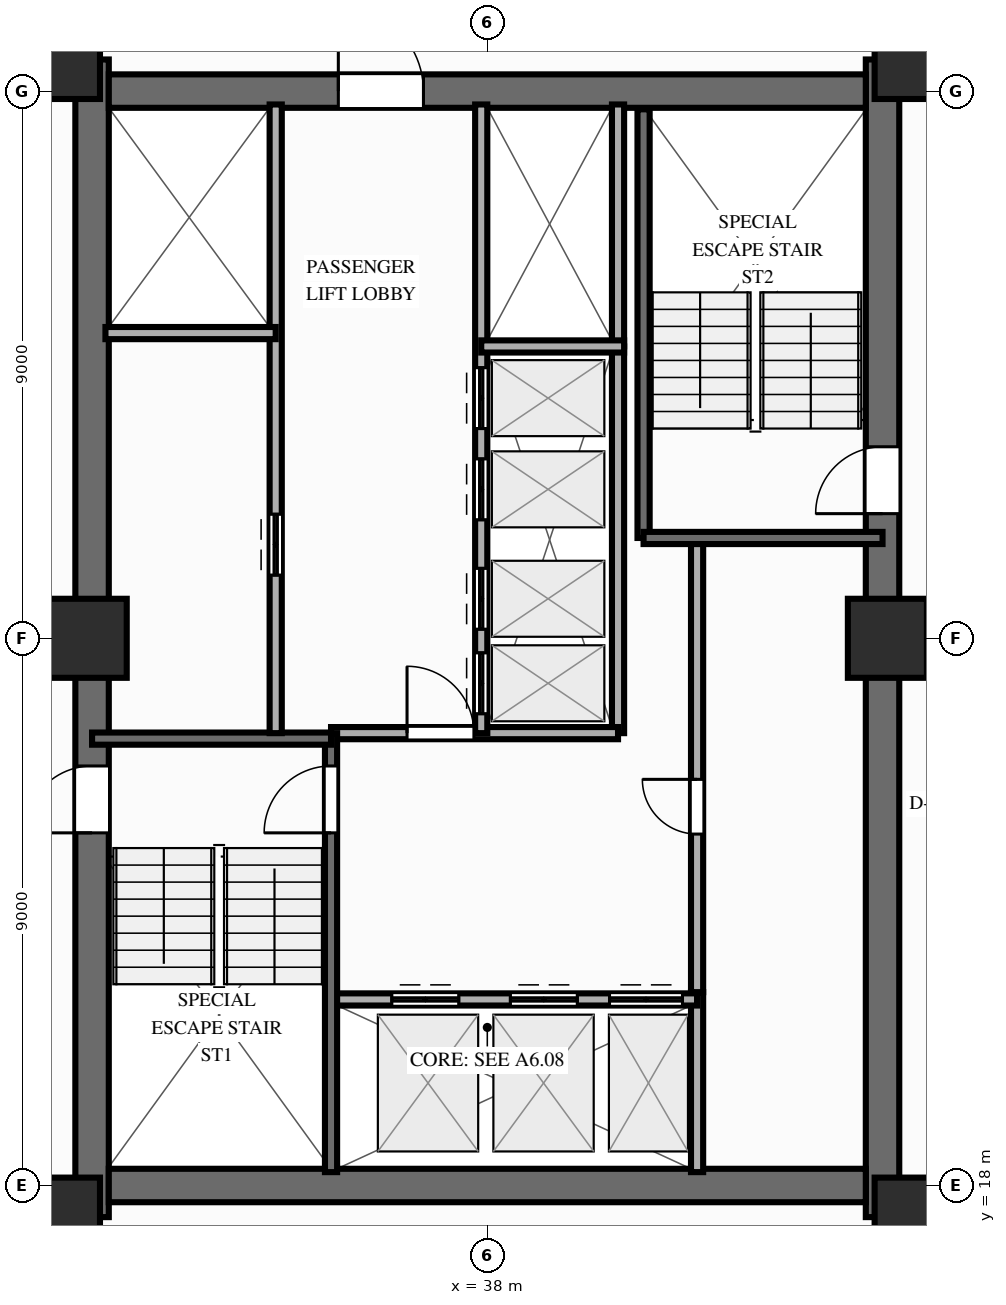
"""IFC4 building model, lengths in metres.
Left out: names, types, materials, properties, quantities, classifications, styles, units other than length and angle.
Written with IfcOpenShell. Run it as: python <this file> out.ifc"""

import sys

from ifc_helpers import new_model, si_unit, direction, frame, frame_2d, origin, origin_2d, place, context, subcontext, project, spatial, rectangle, extrude, source, transform, mapped, element, fill, save


model = new_model("IFC4")
c1 = context("Model", 3, precision=1e-05, world=origin(), true_north=direction((0.0, 1.0)))
c2 = subcontext(c1, "Body", "Model", "MODEL_VIEW")
j1 = project(units=[si_unit("LENGTHUNIT", "METRE"), si_unit("PLANEANGLEUNIT", "RADIAN")], contexts=[c1])
p1 = place(None, origin())
s1 = spatial("IfcSite", under=j1, at=p1, CompositionType="ELEMENT")
p2 = place(p1, origin())
s2 = spatial("IfcBuilding", under=s1, at=p2, CompositionType="ELEMENT")
p3 = place(p2, frame((0.0, 0.0, 92.85)))
s3 = spatial("IfcBuildingStorey", under=s2, at=p3, CompositionType="ELEMENT", Elevation=92.85)
p4 = place(p3, frame((31.5, 17.48, 0.0), z_axis=(0.0, 0.0, 1.0), x_axis=(0.0, 1.0, 0.0)))
e1 = element("IfcWall", 1, at=p4, inside=s3, PredefinedType="SHEAR", context=c2, shape_type="SweptSolid", body=[
    extrude(rectangle(XDim=19.04, YDim=0.55, at=frame_2d((9.52, 0.0))), origin(), (0.0, 0.0, 1.0), 3.0),
])
p5 = place(p4, frame((6.32, 0.0, 0.0)))
e2 = element("IfcOpeningElement", 2, at=p5, cuts=e1, PredefinedType="OPENING", context=c2, shape_type="SweptSolid", body=[
    extrude(rectangle(XDim=1.1, YDim=2.15, at=frame_2d((0.55, 1.075))), frame((0.0, 0.287, 0.0), z_axis=(0.0, -1.0, 0.0), x_axis=(1.0, 0.0, 0.0)), (0.0, 0.0, 1.0), 0.574),
])
p6 = place(p3, frame((44.5, 17.48, 0.0), z_axis=(0.0, 0.0, 1.0), x_axis=(0.0, 1.0, 0.0)))
e3 = element("IfcWall", 3, at=p6, inside=s3, PredefinedType="SHEAR", context=c2, shape_type="SweptSolid", body=[
    extrude(rectangle(XDim=19.04, YDim=0.55, at=frame_2d((9.52, 0.0))), origin(), (0.0, 0.0, 1.0), 3.0),
])
p7 = place(p6, frame((12.67, 0.0, 0.0), z_axis=(0.0, 0.0, 1.0), x_axis=(-1.0, 0.0, 0.0)))
e4 = element("IfcOpeningElement", 4, at=p7, cuts=e3, PredefinedType="OPENING", context=c2, shape_type="SweptSolid", body=[
    extrude(rectangle(XDim=1.1, YDim=2.15, at=frame_2d((0.55, 1.075))), frame((0.0, 0.287, 0.0), z_axis=(0.0, -1.0, 0.0), x_axis=(1.0, 0.0, 0.0)), (0.0, 0.0, 1.0), 0.574),
])
p8 = place(p3, frame((31.775, 18.0, 0.0), z_axis=(0.0, 0.0, 1.0), x_axis=(1.0, 0.0, 0.0)))
e5 = element("IfcWall", 5, at=p8, inside=s3, PredefinedType="SHEAR", context=c2, shape_type="SweptSolid", body=[
    extrude(rectangle(XDim=12.45, YDim=0.55, at=frame_2d((6.225, 0.0))), origin(), (0.0, 0.0, 1.0), 3.0),
])
p9 = place(p3, frame((31.775, 36.0, 0.0), z_axis=(0.0, 0.0, 1.0), x_axis=(1.0, 0.0, 0.0)))
e6 = element("IfcWall", 6, at=p9, inside=s3, PredefinedType="SHEAR", context=c2, shape_type="SweptSolid", body=[
    extrude(rectangle(XDim=12.45, YDim=0.55, at=frame_2d((6.225, 0.0))), origin(), (0.0, 0.0, 1.0), 3.0),
])
p10 = place(p9, frame((5.175, 0.0, 0.0), z_axis=(0.0, 0.0, 1.0), x_axis=(-1.0, 0.0, 0.0)))
e7 = element("IfcOpeningElement", 7, at=p10, cuts=e6, PredefinedType="OPENING", context=c2, shape_type="SweptSolid", body=[
    extrude(rectangle(XDim=1.4, YDim=2.15, at=frame_2d((0.7, 1.075))), frame((0.0, 0.287, 0.0), z_axis=(0.0, -1.0, 0.0), x_axis=(1.0, 0.0, 0.0)), (0.0, 0.0, 1.0), 0.574),
])
m1 = source(origin(), c2, "Body", "SweptSolid", [
    extrude(rectangle(XDim=1.3, YDim=1.3, at=origin_2d()), origin(), (0.0, 0.0, 1.0), 3.0),
])
for number, where, z_axis, x_axis in (
    (8, (30.98, 17.48, 0.0), (0.0, 0.0, 1.0), (1.0, 0.0, 0.0)),
    (9, (45.02, 17.48, 0.0), (0.0, 0.0, 1.0), (1.0, 0.0, 0.0)),
    (10, (30.98, 36.52, 0.0), (0.0, 0.0, 1.0), (1.0, 0.0, 0.0)),
    (11, (45.02, 36.52, 0.0), (0.0, 0.0, 1.0), (1.0, 0.0, 0.0)),
    (12, (31.42, 27.0, 0.0), (0.0, 0.0, 1.0), (1.0, 0.0, 0.0)),
    (13, (44.58, 27.0, 0.0), (0.0, 0.0, 1.0), (1.0, 0.0, 0.0)),
):
    element("IfcColumn", number, at=place(p3, frame(where, z_axis=z_axis, x_axis=x_axis)), inside=s3, PredefinedType="COLUMN", context=c2, shape_type="MappedRepresentation", body=[
        mapped(m1, transform((0.0, 0.0, 0.0), scale=1.0)),
    ])
p11 = place(p3, frame((41.45, 18.22, 0.0), z_axis=(0.0, 0.0, 1.0), x_axis=(0.0, 1.0, 0.0)))
e14 = element("IfcWall", 14, at=p11, inside=s3, PredefinedType="PARTITIONING", context=c2, shape_type="SweptSolid", body=[
    extrude(rectangle(XDim=2.96, YDim=0.2, at=frame_2d((1.48, 0.0))), origin(), (0.0, 0.0, 1.0), 2.79),
])
p12 = place(p3, frame((41.45, 21.18, 0.0), z_axis=(0.0, 0.0, 1.0), x_axis=(0.0, 1.0, 0.0)))
e15 = element("IfcWall", 15, at=p12, inside=s3, PredefinedType="PARTITIONING", context=c2, shape_type="SweptSolid", body=[
    extrude(rectangle(XDim=7.42, YDim=0.2, at=frame_2d((3.71, 0.0))), origin(), (0.0, 0.0, 1.0), 2.79),
])
p13 = place(p12, frame((2.6, 0.0, 0.0)))
e16 = element("IfcOpeningElement", 16, at=p13, cuts=e15, PredefinedType="OPENING", context=c2, shape_type="SweptSolid", body=[
    extrude(rectangle(XDim=0.9, YDim=2.1, at=frame_2d((0.45, 1.05))), frame((0.0, 0.112, 0.0), z_axis=(0.0, -1.0, 0.0), x_axis=(1.0, 0.0, 0.0)), (0.0, 0.0, 1.0), 0.224),
])
p14 = place(p3, frame((40.15, 25.44, 0.0), z_axis=(0.0, 0.0, 1.0), x_axis=(0.0, 1.0, 0.0)))
e17 = element("IfcWall", 17, at=p14, inside=s3, PredefinedType="PARTITIONING", context=c2, shape_type="SweptSolid", body=[
    extrude(rectangle(XDim=6.36, YDim=0.2, at=frame_2d((3.18, 0.0))), origin(), (0.0, 0.0, 1.0), 2.79),
])
p15 = place(p3, frame((40.15, 31.8, 0.0), z_axis=(0.0, 0.0, 1.0), x_axis=(0.0, 1.0, 0.0)))
e18 = element("IfcWall", 18, at=p15, inside=s3, PredefinedType="PARTITIONING", context=c2, shape_type="SweptSolid", body=[
    extrude(rectangle(XDim=3.98, YDim=0.2, at=frame_2d((1.99, 0.0))), origin(), (0.0, 0.0, 1.0), 2.79),
])
p16 = place(p3, frame((35.43, 21.06, 0.0), z_axis=(0.0, 0.0, 1.0), x_axis=(1.0, 0.0, 0.0)))
e19 = element("IfcWall", 19, at=p16, inside=s3, PredefinedType="PARTITIONING", context=c2, shape_type="SweptSolid", body=[
    extrude(rectangle(XDim=6.02, YDim=0.2, at=frame_2d((3.01, 0.0))), origin(), (0.0, 0.0, 1.0), 2.79),
])
p17 = place(p16, frame((1.0, 0.0, 0.0)))
e20 = element("IfcOpeningElement", 20, at=p17, cuts=e19, PredefinedType="OPENING", context=c2, shape_type="SweptSolid", body=[
    extrude(rectangle(XDim=1.1, YDim=2.15, at=frame_2d((0.55, 1.075))), frame((0.0, 0.112, 0.0), z_axis=(0.0, -1.0, 0.0), x_axis=(1.0, 0.0, 0.0)), (0.0, 0.0, 1.0), 0.224),
])
p18 = place(p16, frame((2.95, 0.0, 0.0)))
e21 = element("IfcOpeningElement", 21, at=p18, cuts=e19, PredefinedType="OPENING", context=c2, shape_type="SweptSolid", body=[
    extrude(rectangle(XDim=1.1, YDim=2.15, at=frame_2d((0.55, 1.075))), frame((0.0, 0.112, 0.0), z_axis=(0.0, -1.0, 0.0), x_axis=(1.0, 0.0, 0.0)), (0.0, 0.0, 1.0), 0.224),
])
p19 = place(p16, frame((4.58, 0.0, 0.0)))
e22 = element("IfcOpeningElement", 22, at=p19, cuts=e19, PredefinedType="OPENING", context=c2, shape_type="SweptSolid", body=[
    extrude(rectangle(XDim=1.2, YDim=2.15, at=frame_2d((0.6, 1.075))), frame((0.0, 0.112, 0.0), z_axis=(0.0, -1.0, 0.0), x_axis=(1.0, 0.0, 0.0)), (0.0, 0.0, 1.0), 0.224),
])
p20 = place(p3, frame((35.43, 25.44, 0.0), z_axis=(0.0, 0.0, 1.0), x_axis=(1.0, 0.0, 0.0)))
e23 = element("IfcWall", 23, at=p20, inside=s3, PredefinedType="PARTITIONING", context=c2, shape_type="SweptSolid", body=[
    extrude(rectangle(XDim=4.72, YDim=0.2, at=frame_2d((2.36, 0.0))), origin(), (0.0, 0.0, 1.0), 2.79),
])
p21 = place(p20, frame((1.25, 0.0, 0.0)))
e24 = element("IfcOpeningElement", 24, at=p21, cuts=e23, PredefinedType="OPENING", context=c2, shape_type="SweptSolid", body=[
    extrude(rectangle(XDim=1.1, YDim=2.15, at=frame_2d((0.55, 1.075))), frame((0.0, 0.112, 0.0), z_axis=(0.0, -1.0, 0.0), x_axis=(1.0, 0.0, 0.0)), (0.0, 0.0, 1.0), 0.224),
])
p22 = place(p3, frame((35.43, 18.22, 0.0), z_axis=(0.0, 0.0, 1.0), x_axis=(0.0, 1.0, 0.0)))
e25 = element("IfcWall", 25, at=p22, inside=s3, PredefinedType="SOLIDWALL", context=c2, shape_type="SweptSolid", body=[
    extrude(rectangle(XDim=7.22, YDim=0.2, at=frame_2d((3.61, 0.0))), origin(), (0.0, 0.0, 1.0), 2.79),
])
p23 = place(p22, frame((6.68, 0.0, 0.0), z_axis=(0.0, 0.0, 1.0), x_axis=(-1.0, 0.0, 0.0)))
e26 = element("IfcOpeningElement", 26, at=p23, cuts=e25, PredefinedType="OPENING", context=c2, shape_type="SweptSolid", body=[
    extrude(rectangle(XDim=1.1, YDim=2.15, at=frame_2d((0.55, 1.075))), frame((0.0, 0.112, 0.0), z_axis=(0.0, -1.0, 0.0), x_axis=(1.0, 0.0, 0.0)), (0.0, 0.0, 1.0), 0.224),
])
p24 = place(p3, frame((31.5, 25.35, 0.0), z_axis=(0.0, 0.0, 1.0), x_axis=(1.0, 0.0, 0.0)))
e27 = element("IfcWall", 27, at=p24, inside=s3, PredefinedType="SOLIDWALL", context=c2, shape_type="SweptSolid", body=[
    extrude(rectangle(XDim=3.93, YDim=0.2, at=frame_2d((1.965, 0.0))), origin(), (0.0, 0.0, 1.0), 2.79),
])
p25 = place(p3, frame((40.57, 28.65, 0.0), z_axis=(0.0, 0.0, 1.0), x_axis=(0.0, 1.0, 0.0)))
e28 = element("IfcWall", 28, at=p25, inside=s3, PredefinedType="SOLIDWALL", context=c2, shape_type="SweptSolid", body=[
    extrude(rectangle(XDim=7.05, YDim=0.2, at=frame_2d((3.525, 0.0))), origin(), (0.0, 0.0, 1.0), 2.79),
])
p26 = place(p3, frame((40.57, 28.65, 0.0), z_axis=(0.0, 0.0, 1.0), x_axis=(1.0, 0.0, 0.0)))
e29 = element("IfcWall", 29, at=p26, inside=s3, PredefinedType="SOLIDWALL", context=c2, shape_type="SweptSolid", body=[
    extrude(rectangle(XDim=3.93, YDim=0.2, at=frame_2d((1.965, 0.0))), origin(), (0.0, 0.0, 1.0), 2.79),
])
p27 = place(p3, frame((34.52, 25.44, 0.0), z_axis=(0.0, 0.0, 1.0), x_axis=(0.0, 1.0, 0.0)))
e30 = element("IfcWall", 30, at=p27, inside=s3, PredefinedType="PARTITIONING", context=c2, shape_type="SweptSolid", body=[
    extrude(rectangle(XDim=10.34, YDim=0.2, at=frame_2d((5.17, 0.0))), origin(), (0.0, 0.0, 1.0), 2.79),
])
p28 = place(p27, frame((2.6, 0.0, 0.0)))
e31 = element("IfcOpeningElement", 31, at=p28, cuts=e30, PredefinedType="OPENING", context=c2, shape_type="SweptSolid", body=[
    extrude(rectangle(XDim=1.0, YDim=2.15, at=frame_2d((0.5, 1.075))), frame((0.0, 0.112, 0.0), z_axis=(0.0, -1.0, 0.0), x_axis=(1.0, 0.0, 0.0)), (0.0, 0.0, 1.0), 0.224),
])
p29 = place(p3, frame((31.72, 32.02, 0.0), z_axis=(0.0, 0.0, 1.0), x_axis=(1.0, 0.0, 0.0)))
e32 = element("IfcWall", 32, at=p29, inside=s3, PredefinedType="PARTITIONING", context=c2, shape_type="SweptSolid", body=[
    extrude(rectangle(XDim=2.8, YDim=0.2, at=frame_2d((1.4, 0.0))), origin(), (0.0, 0.0, 1.0), 2.79),
])
p30 = place(p3, frame((37.9, 25.44, 0.0), z_axis=(0.0, 0.0, 1.0), x_axis=(0.0, 1.0, 0.0)))
e33 = element("IfcWall", 33, at=p30, inside=s3, PredefinedType="PARTITIONING", context=c2, shape_type="SweptSolid", body=[
    extrude(rectangle(XDim=10.34, YDim=0.2, at=frame_2d((5.17, 0.0))), origin(), (0.0, 0.0, 1.0), 2.79),
])
p31 = place(p30, frame((0.32, 0.0, 0.0)))
e34 = element("IfcOpeningElement", 34, at=p31, cuts=e33, PredefinedType="OPENING", context=c2, shape_type="SweptSolid", body=[
    extrude(rectangle(XDim=1.0, YDim=2.15, at=frame_2d((0.5, 1.075))), frame((0.0, 0.112, 0.0), z_axis=(0.0, -1.0, 0.0), x_axis=(1.0, 0.0, 0.0)), (0.0, 0.0, 1.0), 0.224),
])
p32 = place(p30, frame((1.71, 0.0, 0.0)))
e35 = element("IfcOpeningElement", 35, at=p32, cuts=e33, PredefinedType="OPENING", context=c2, shape_type="SweptSolid", body=[
    extrude(rectangle(XDim=1.0, YDim=2.15, at=frame_2d((0.5, 1.075))), frame((0.0, 0.112, 0.0), z_axis=(0.0, -1.0, 0.0), x_axis=(1.0, 0.0, 0.0)), (0.0, 0.0, 1.0), 0.224),
])
p33 = place(p30, frame((3.51, 0.0, 0.0)))
e36 = element("IfcOpeningElement", 36, at=p33, cuts=e33, PredefinedType="OPENING", context=c2, shape_type="SweptSolid", body=[
    extrude(rectangle(XDim=1.0, YDim=2.15, at=frame_2d((0.5, 1.075))), frame((0.0, 0.112, 0.0), z_axis=(0.0, -1.0, 0.0), x_axis=(1.0, 0.0, 0.0)), (0.0, 0.0, 1.0), 0.224),
])
p34 = place(p30, frame((5.01, 0.0, 0.0)))
e37 = element("IfcOpeningElement", 37, at=p34, cuts=e33, PredefinedType="OPENING", context=c2, shape_type="SweptSolid", body=[
    extrude(rectangle(XDim=1.0, YDim=2.15, at=frame_2d((0.5, 1.075))), frame((0.0, 0.112, 0.0), z_axis=(0.0, -1.0, 0.0), x_axis=(1.0, 0.0, 0.0)), (0.0, 0.0, 1.0), 0.224),
])
p35 = place(p3, frame((37.9, 31.8, 0.0), z_axis=(0.0, 0.0, 1.0), x_axis=(1.0, 0.0, 0.0)))
e38 = element("IfcWall", 38, at=p35, inside=s3, PredefinedType="PARTITIONING", context=c2, shape_type="SweptSolid", body=[
    extrude(rectangle(XDim=2.35, YDim=0.2, at=frame_2d((1.175, 0.0))), origin(), (0.0, 0.0, 1.0), 2.79),
])
m2 = source(origin(), c2, "Body", "SweptSolid", [
    extrude(rectangle(XDim=1.1, YDim=2.15, at=frame_2d((0.55, 1.075))), frame((0.0, 0.025, 0.0), z_axis=(0.0, -1.0, 0.0), x_axis=(1.0, 0.0, 0.0)), (0.0, 0.0, 1.0), 0.05),
])
p36 = place(p5, origin())
e39 = element("IfcDoor", 39, at=p36, inside=s3, OperationType="SINGLE_SWING_LEFT", PredefinedType="DOOR", context=c2, shape_type="MappedRepresentation", body=[
    mapped(m2, transform((0.0, 0.0, 0.0), scale=1.0)),
])
fill(e2, e39)
p37 = place(p7, origin())
e40 = element("IfcDoor", 40, at=p37, inside=s3, OperationType="SINGLE_SWING_RIGHT", PredefinedType="DOOR", context=c2, shape_type="MappedRepresentation", body=[
    mapped(m2, transform((0.0, 0.0, 0.0), scale=1.0)),
])
fill(e4, e40)
m3 = source(origin(), c2, "Body", "SweptSolid", [
    extrude(rectangle(XDim=1.4, YDim=2.15, at=frame_2d((0.7, 1.075))), frame((0.0, 0.025, 0.0), z_axis=(0.0, -1.0, 0.0), x_axis=(1.0, 0.0, 0.0)), (0.0, 0.0, 1.0), 0.05),
])
p38 = place(p10, origin())
e41 = element("IfcDoor", 41, at=p38, inside=s3, OperationType="SINGLE_SWING_RIGHT", PredefinedType="DOOR", context=c2, shape_type="MappedRepresentation", body=[
    mapped(m3, transform((0.0, 0.0, 0.0), scale=1.0)),
])
fill(e7, e41)
m4 = source(origin(), c2, "Body", "SweptSolid", [
    extrude(rectangle(XDim=0.9, YDim=2.1, at=frame_2d((0.45, 1.05))), frame((0.0, 0.025, 0.0), z_axis=(0.0, -1.0, 0.0), x_axis=(1.0, 0.0, 0.0)), (0.0, 0.0, 1.0), 0.05),
])
p39 = place(p13, origin())
e42 = element("IfcDoor", 42, at=p39, inside=s3, OperationType="SINGLE_SWING_RIGHT", PredefinedType="DOOR", context=c2, shape_type="MappedRepresentation", body=[
    mapped(m4, transform((0.0, 0.0, 0.0), scale=1.0)),
])
fill(e16, e42)
p40 = place(p17, origin())
e43 = element("IfcDoor", 43, at=p40, inside=s3, OperationType="DOUBLE_DOOR_SLIDING", PredefinedType="DOOR", context=c2, shape_type="MappedRepresentation", body=[
    mapped(m2, transform((0.0, 0.0, 0.0), scale=1.0)),
])
fill(e20, e43)
p41 = place(p18, origin())
e44 = element("IfcDoor", 44, at=p41, inside=s3, OperationType="DOUBLE_DOOR_SLIDING", PredefinedType="DOOR", context=c2, shape_type="MappedRepresentation", body=[
    mapped(m2, transform((0.0, 0.0, 0.0), scale=1.0)),
])
fill(e21, e44)
m5 = source(origin(), c2, "Body", "SweptSolid", [
    extrude(rectangle(XDim=1.2, YDim=2.15, at=frame_2d((0.6, 1.075))), frame((0.0, 0.025, 0.0), z_axis=(0.0, -1.0, 0.0), x_axis=(1.0, 0.0, 0.0)), (0.0, 0.0, 1.0), 0.05),
])
p42 = place(p19, origin())
e45 = element("IfcDoor", 45, at=p42, inside=s3, OperationType="DOUBLE_DOOR_SLIDING", PredefinedType="DOOR", context=c2, shape_type="MappedRepresentation", body=[
    mapped(m5, transform((0.0, 0.0, 0.0), scale=1.0)),
])
fill(e22, e45)
p43 = place(p21, origin())
e46 = element("IfcDoor", 46, at=p43, inside=s3, OperationType="SINGLE_SWING_LEFT", PredefinedType="DOOR", context=c2, shape_type="MappedRepresentation", body=[
    mapped(m2, transform((0.0, 0.0, 0.0), scale=1.0)),
])
fill(e24, e46)
p44 = place(p23, origin())
e47 = element("IfcDoor", 47, at=p44, inside=s3, OperationType="SINGLE_SWING_RIGHT", PredefinedType="DOOR", context=c2, shape_type="MappedRepresentation", body=[
    mapped(m2, transform((0.0, 0.0, 0.0), scale=1.0)),
])
fill(e26, e47)
m6 = source(origin(), c2, "Body", "SweptSolid", [
    extrude(rectangle(XDim=1.0, YDim=2.15, at=frame_2d((0.5, 1.075))), frame((0.0, 0.025, 0.0), z_axis=(0.0, -1.0, 0.0), x_axis=(1.0, 0.0, 0.0)), (0.0, 0.0, 1.0), 0.05),
])
p45 = place(p28, origin())
e48 = element("IfcDoor", 48, at=p45, inside=s3, OperationType="DOUBLE_DOOR_SLIDING", PredefinedType="DOOR", context=c2, shape_type="MappedRepresentation", body=[
    mapped(m6, transform((0.0, 0.0, 0.0), scale=1.0)),
])
fill(e31, e48)
p46 = place(p31, origin())
e49 = element("IfcDoor", 49, at=p46, inside=s3, OperationType="DOUBLE_DOOR_SLIDING", PredefinedType="DOOR", context=c2, shape_type="MappedRepresentation", body=[
    mapped(m6, transform((0.0, 0.0, 0.0), scale=1.0)),
])
fill(e34, e49)
p47 = place(p32, origin())
e50 = element("IfcDoor", 50, at=p47, inside=s3, OperationType="DOUBLE_DOOR_SLIDING", PredefinedType="DOOR", context=c2, shape_type="MappedRepresentation", body=[
    mapped(m6, transform((0.0, 0.0, 0.0), scale=1.0)),
])
fill(e35, e50)
p48 = place(p33, origin())
e51 = element("IfcDoor", 51, at=p48, inside=s3, OperationType="DOUBLE_DOOR_SLIDING", PredefinedType="DOOR", context=c2, shape_type="MappedRepresentation", body=[
    mapped(m6, transform((0.0, 0.0, 0.0), scale=1.0)),
])
fill(e36, e51)
p49 = place(p34, origin())
e52 = element("IfcDoor", 52, at=p49, inside=s3, OperationType="DOUBLE_DOOR_SLIDING", PredefinedType="DOOR", context=c2, shape_type="MappedRepresentation", body=[
    mapped(m6, transform((0.0, 0.0, 0.0), scale=1.0)),
])
fill(e37, e52)
save(model, sys.argv[1])
